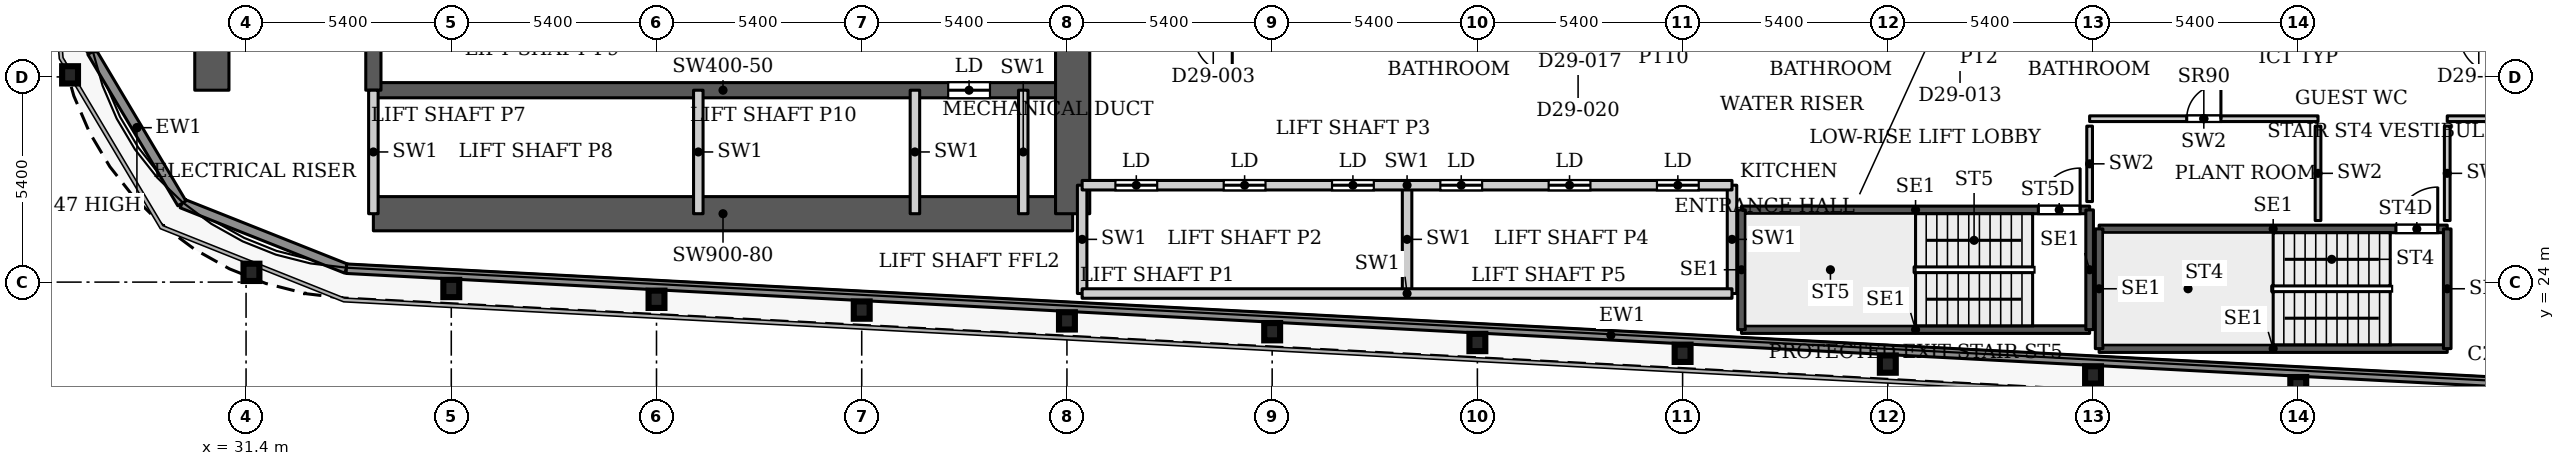
"""IFC4 building model, lengths in metres.
Left out: names, types, materials, properties, quantities, classifications, styles, units other than length and angle.
Written with IfcOpenShell. Run it as: python <this file> out.ifc"""

import sys

from ifc_helpers import new_model, si_unit, direction, frame, frame_2d, origin, origin_2d, place, context, subcontext, project, spatial, rectangle, i_section, extrude, source, transform, mapped, element, fill, save


model = new_model("IFC4")
c1 = context("Model", 3, precision=1e-05, world=origin(), true_north=direction((0.0, 1.0)))
c2 = subcontext(c1, "Body", "Model", "MODEL_VIEW")
j1 = project(units=[si_unit("LENGTHUNIT", "METRE"), si_unit("PLANEANGLEUNIT", "RADIAN")], contexts=[c1])
p1 = place(None, origin())
s1 = spatial("IfcSite", under=j1, at=p1, CompositionType="ELEMENT")
p2 = place(p1, origin())
s2 = spatial("IfcBuilding", under=s1, at=p2, CompositionType="ELEMENT")
p3 = place(p2, frame((0.0, 0.0, 125.3)))
s3 = spatial("IfcBuildingStorey", under=s2, at=p3, CompositionType="ELEMENT", Elevation=125.3)
for number, where, z_axis, x_axis in (
    (1, (85.4, 21.274, 0.0), (0.0, 0.0, 1.0), (1.0, 0.0, 0.0)),
    (2, (80.0, 21.558, 0.0), (0.0, 0.0, 1.0), (1.0, 0.0, 0.0)),
    (3, (74.6, 21.843, 0.0), (0.0, 0.0, 1.0), (1.0, 0.0, 0.0)),
    (4, (69.2, 22.127, 0.0), (0.0, 0.0, 1.0), (1.0, 0.0, 0.0)),
    (5, (63.8, 22.411, 0.0), (0.0, 0.0, 1.0), (1.0, 0.0, 0.0)),
    (6, (58.4, 22.695, 0.0), (0.0, 0.0, 1.0), (1.0, 0.0, 0.0)),
    (7, (53.0, 22.98, 0.0), (0.0, 0.0, 1.0), (1.0, 0.0, 0.0)),
    (8, (47.6, 23.264, 0.0), (0.0, 0.0, 1.0), (1.0, 0.0, 0.0)),
    (9, (42.2, 23.548, 0.0), (0.0, 0.0, 1.0), (1.0, 0.0, 0.0)),
    (10, (36.8, 23.832, 0.0), (0.0, 0.0, 1.0), (1.0, 0.0, 0.0)),
    (11, (31.542, 24.257, 0.0), (0.0, 0.0, 1.0), (1.0, 0.0, 0.0)),
    (12, (26.769, 29.454, 0.0), (0.0, 0.0, 1.0), (1.0, 0.0, 0.0)),
):
    element("IfcColumn", number, at=place(p3, frame(where, z_axis=z_axis, x_axis=x_axis)), inside=s3, PredefinedType="COLUMN", context=c2, shape_type="SweptSolid", body=[
        extrude(i_section(OverallWidth=0.418, OverallDepth=0.455, WebThickness=0.042, FlangeThickness=0.068, FilletRadius=0.014, at=origin_2d()), origin(), (0.0, 0.0, 1.0), 3.9),
    ])
p4 = place(p3, frame((34.75, 25.8, 0.0), z_axis=(0.0, 0.0, 1.0), x_axis=(1.0, 0.0, 0.0)))
e13 = element("IfcWall", 13, at=p4, inside=s3, PredefinedType="SHEAR", context=c2, shape_type="SweptSolid", body=[
    extrude(rectangle(XDim=18.4, YDim=0.9, at=frame_2d((9.2, 0.0))), origin(), (0.0, 0.0, 1.0), 3.9),
])
p5 = place(p3, frame((34.75, 29.05, 0.0), z_axis=(0.0, 0.0, 1.0), x_axis=(1.0, 0.0, 0.0)))
e14 = element("IfcWall", 14, at=p5, inside=s3, PredefinedType="SHEAR", context=c2, shape_type="SweptSolid", body=[
    extrude(rectangle(XDim=18.4, YDim=0.4, at=frame_2d((9.2, 0.0))), origin(), (0.0, 0.0, 1.0), 3.9),
])
p6 = place(p5, frame((15.125, 0.0, 0.0)))
e15 = element("IfcOpeningElement", 15, at=p6, cuts=e14, PredefinedType="OPENING", context=c2, shape_type="SweptSolid", body=[
    extrude(rectangle(XDim=1.1, YDim=2.2, at=frame_2d((0.55, 1.1))), frame((0.0, 0.21, 0.0), z_axis=(0.0, -1.0, 0.0), x_axis=(1.0, 0.0, 0.0)), (0.0, 0.0, 1.0), 0.42),
])
p7 = place(p3, frame((34.75, 29.05, 0.0), z_axis=(0.0, 0.0, 1.0), x_axis=(0.0, 1.0, 0.0)))
e16 = element("IfcWall", 16, at=p7, inside=s3, PredefinedType="SHEAR", context=c2, shape_type="SweptSolid", body=[
    extrude(rectangle(XDim=18.45, YDim=0.4, at=frame_2d((9.225, 0.0))), origin(), (0.0, 0.0, 1.0), 3.9),
])
p8 = place(p7, frame((8.025, 0.0, 0.0)))
e17 = element("IfcOpeningElement", 17, at=p8, cuts=e16, PredefinedType="OPENING", context=c2, shape_type="SweptSolid", body=[
    extrude(rectangle(XDim=1.1, YDim=2.2, at=frame_2d((0.55, 1.1))), frame((0.0, 0.21, 0.0), z_axis=(0.0, -1.0, 0.0), x_axis=(1.0, 0.0, 0.0)), (0.0, 0.0, 1.0), 0.42),
])
p9 = place(p7, frame((10.875, 0.0, 0.0)))
e18 = element("IfcOpeningElement", 18, at=p9, cuts=e16, PredefinedType="OPENING", context=c2, shape_type="SweptSolid", body=[
    extrude(rectangle(XDim=1.1, YDim=2.2, at=frame_2d((0.55, 1.1))), frame((0.0, 0.21, 0.0), z_axis=(0.0, -1.0, 0.0), x_axis=(1.0, 0.0, 0.0)), (0.0, 0.0, 1.0), 0.42),
])
p10 = place(p7, frame((13.725, 0.0, 0.0)))
e19 = element("IfcOpeningElement", 19, at=p10, cuts=e16, PredefinedType="OPENING", context=c2, shape_type="SweptSolid", body=[
    extrude(rectangle(XDim=1.1, YDim=2.2, at=frame_2d((0.55, 1.1))), frame((0.0, 0.21, 0.0), z_axis=(0.0, -1.0, 0.0), x_axis=(1.0, 0.0, 0.0)), (0.0, 0.0, 1.0), 0.42),
])
p11 = place(p7, frame((15.95, 0.0, 0.0)))
e20 = element("IfcOpeningElement", 20, at=p11, cuts=e16, PredefinedType="OPENING", context=c2, shape_type="SweptSolid", body=[
    extrude(rectangle(XDim=1.1, YDim=2.2, at=frame_2d((0.55, 1.1))), frame((0.0, 0.21, 0.0), z_axis=(0.0, -1.0, 0.0), x_axis=(1.0, 0.0, 0.0)), (0.0, 0.0, 1.0), 0.42),
])
p12 = place(p3, frame((30.5, 29.05, 0.0), z_axis=(0.0, 0.0, 1.0), x_axis=(0.0, 1.0, 0.0)))
e21 = element("IfcWall", 21, at=p12, inside=s3, PredefinedType="SHEAR", context=c2, shape_type="SweptSolid", body=[
    extrude(rectangle(XDim=18.45, YDim=0.9, at=frame_2d((9.225, 0.0))), origin(), (0.0, 0.0, 1.0), 3.9),
])
p13 = place(p12, frame((6.55, 0.0, 0.0)))
e22 = element("IfcOpeningElement", 22, at=p13, cuts=e21, PredefinedType="OPENING", context=c2, shape_type="SweptSolid", body=[
    extrude(rectangle(XDim=0.9, YDim=2.2, at=frame_2d((0.45, 1.1))), frame((0.0, 0.46, 0.0), z_axis=(0.0, -1.0, 0.0), x_axis=(1.0, 0.0, 0.0)), (0.0, 0.0, 1.0), 0.92),
])
p14 = place(p12, frame((11.025, 0.0, 0.0)))
e23 = element("IfcOpeningElement", 23, at=p14, cuts=e21, PredefinedType="OPENING", context=c2, shape_type="SweptSolid", body=[
    extrude(rectangle(XDim=0.9, YDim=2.2, at=frame_2d((0.45, 1.1))), frame((0.0, 0.46, 0.0), z_axis=(0.0, -1.0, 0.0), x_axis=(1.0, 0.0, 0.0)), (0.0, 0.0, 1.0), 0.92),
])
p15 = place(p3, frame((53.15, 25.8, 0.0), z_axis=(0.0, 0.0, 1.0), x_axis=(0.0, 1.0, 0.0)))
e24 = element("IfcWall", 24, at=p15, inside=s3, PredefinedType="SHEAR", context=c2, shape_type="SweptSolid", body=[
    extrude(rectangle(XDim=10.4, YDim=0.9, at=frame_2d((5.2, 0.0))), origin(), (0.0, 0.0, 1.0), 3.9),
])
p16 = place(p3, frame((34.039, 24.353, 0.0), z_axis=(0.0, 0.0, 1.0), x_axis=(-0.929352825399, 0.369192803184, 0.0)))
e25 = element("IfcWall", 25, at=p16, inside=s3, PredefinedType="SOLIDWALL", context=c2, shape_type="SweptSolid", body=[
    extrude(rectangle(XDim=4.656, YDim=0.25, at=frame_2d((2.328, 0.0))), origin(), (0.0, 0.0, 1.0), 3.75),
])
p17 = place(p3, frame((29.712, 26.072, 0.0), z_axis=(0.0, 0.0, 1.0), x_axis=(-0.511028049012, 0.859564036662, 0.0)))
e26 = element("IfcWall", 26, at=p17, inside=s3, PredefinedType="SOLIDWALL", context=c2, shape_type="SweptSolid", body=[
    extrude(rectangle(XDim=4.634, YDim=0.25, at=frame_2d((2.317, 0.0))), origin(), (0.0, 0.0, 1.0), 3.147),
])
p18 = place(p3, frame((27.344, 30.055, 0.0), z_axis=(0.0, 0.0, 1.0), x_axis=(-0.077571675317, 0.99698677784, 0.0)))
e27 = element("IfcWall", 27, at=p18, inside=s3, PredefinedType="SOLIDWALL", context=c2, shape_type="SweptSolid", body=[
    extrude(rectangle(XDim=1.92, YDim=0.25, at=frame_2d((0.96, 0.0))), origin(), (0.0, 0.0, 1.0), 3.75),
])
p19 = place(p3, frame((100.586, 20.85, 0.0), z_axis=(0.0, 0.0, 1.0), x_axis=(-0.99861746497, 0.052565755559, 0.0)))
e28 = element("IfcWall", 28, at=p19, inside=s3, PredefinedType="SOLIDWALL", context=c2, shape_type="SweptSolid", body=[
    extrude(rectangle(XDim=66.639, YDim=0.25, at=frame_2d((33.319, 0.0))), origin(), (0.0, 0.0, 1.0), 3.75),
])
p20 = place(p3, frame((80.16, 22.25, 0.0), z_axis=(0.0, 0.0, 1.0), x_axis=(1.0, 0.0, 0.0)))
e29 = element("IfcWall", 29, at=p20, inside=s3, PredefinedType="SHEAR", context=c2, shape_type="SweptSolid", body=[
    extrude(rectangle(XDim=9.16, YDim=0.2, at=frame_2d((4.58, 0.0))), origin(), (0.0, 0.0, 1.0), 3.9),
])
p21 = place(p3, frame((80.16, 25.4, 0.0), z_axis=(0.0, 0.0, 1.0), x_axis=(1.0, 0.0, 0.0)))
e30 = element("IfcWall", 30, at=p21, inside=s3, PredefinedType="SHEAR", context=c2, shape_type="SweptSolid", body=[
    extrude(rectangle(XDim=9.16, YDim=0.2, at=frame_2d((4.58, 0.0))), origin(), (0.0, 0.0, 1.0), 3.9),
])
p22 = place(p21, frame((7.81, 0.0, 0.0)))
e31 = element("IfcOpeningElement", 31, at=p22, cuts=e30, PredefinedType="OPENING", context=c2, shape_type="SweptSolid", body=[
    extrude(rectangle(XDim=1.1, YDim=2.2, at=frame_2d((0.55, 1.1))), frame((0.0, 0.11, 0.0), z_axis=(0.0, -1.0, 0.0), x_axis=(1.0, 0.0, 0.0)), (0.0, 0.0, 1.0), 0.22),
])
for number, where, z_axis, x_axis in (
    (32, (80.16, 22.25, 0.0), (0.0, 0.0, 1.0), (0.0, 1.0, 0.0)),
    (33, (89.32, 22.25, 0.0), (0.0, 0.0, 1.0), (0.0, 1.0, 0.0)),
):
    element("IfcWall", number, at=place(p3, frame(where, z_axis=z_axis, x_axis=x_axis)), inside=s3, PredefinedType="SHEAR", context=c2, shape_type="SweptSolid", body=[
        extrude(rectangle(XDim=3.15, YDim=0.2, at=frame_2d((1.575, 0.0))), origin(), (0.0, 0.0, 1.0), 3.9),
    ])
p23 = place(p3, frame((70.75, 22.75, 0.0), z_axis=(0.0, 0.0, 1.0), x_axis=(1.0, 0.0, 0.0)))
e34 = element("IfcWall", 34, at=p23, inside=s3, PredefinedType="SHEAR", context=c2, shape_type="SweptSolid", body=[
    extrude(rectangle(XDim=9.16, YDim=0.2, at=frame_2d((4.58, 0.0))), origin(), (0.0, 0.0, 1.0), 3.9),
])
p24 = place(p3, frame((70.75, 25.9, 0.0), z_axis=(0.0, 0.0, 1.0), x_axis=(1.0, 0.0, 0.0)))
e35 = element("IfcWall", 35, at=p24, inside=s3, PredefinedType="SHEAR", context=c2, shape_type="SweptSolid", body=[
    extrude(rectangle(XDim=9.16, YDim=0.2, at=frame_2d((4.58, 0.0))), origin(), (0.0, 0.0, 1.0), 3.9),
])
p25 = place(p24, frame((7.81, 0.0, 0.0)))
e36 = element("IfcOpeningElement", 36, at=p25, cuts=e35, PredefinedType="OPENING", context=c2, shape_type="SweptSolid", body=[
    extrude(rectangle(XDim=1.1, YDim=2.2, at=frame_2d((0.55, 1.1))), frame((0.0, 0.11, 0.0), z_axis=(0.0, -1.0, 0.0), x_axis=(1.0, 0.0, 0.0)), (0.0, 0.0, 1.0), 0.22),
])
for number, where, z_axis, x_axis in (
    (37, (70.75, 22.75, 0.0), (0.0, 0.0, 1.0), (0.0, 1.0, 0.0)),
    (38, (79.91, 22.75, 0.0), (0.0, 0.0, 1.0), (0.0, 1.0, 0.0)),
):
    element("IfcWall", number, at=place(p3, frame(where, z_axis=z_axis, x_axis=x_axis)), inside=s3, PredefinedType="SHEAR", context=c2, shape_type="SweptSolid", body=[
        extrude(rectangle(XDim=3.15, YDim=0.2, at=frame_2d((1.575, 0.0))), origin(), (0.0, 0.0, 1.0), 3.9),
    ])
for number, where, z_axis, x_axis in (
    (39, (34.75, 25.8, 0.0), (0.0, 0.0, 1.0), (0.0, 1.0, 0.0)),
    (40, (43.3, 25.8, 0.0), (0.0, 0.0, 1.0), (0.0, 1.0, 0.0)),
    (41, (49.0, 25.8, 0.0), (0.0, 0.0, 1.0), (0.0, 1.0, 0.0)),
    (42, (51.85, 25.8, 0.0), (0.0, 0.0, 1.0), (0.0, 1.0, 0.0)),
):
    element("IfcWall", number, at=place(p3, frame(where, z_axis=z_axis, x_axis=x_axis)), inside=s3, PredefinedType="PARTITIONING", context=c2, shape_type="SweptSolid", body=[
        extrude(rectangle(XDim=3.25, YDim=0.25, at=frame_2d((1.625, 0.0))), origin(), (0.0, 0.0, 1.0), 3.9),
    ])
for number, where, z_axis, x_axis in (
    (43, (53.4, 23.7, 0.0), (0.0, 0.0, 1.0), (0.0, 1.0, 0.0)),
    (44, (61.95, 23.7, 0.0), (0.0, 0.0, 1.0), (0.0, 1.0, 0.0)),
    (45, (70.5, 23.7, 0.0), (0.0, 0.0, 1.0), (0.0, 1.0, 0.0)),
):
    element("IfcWall", number, at=place(p3, frame(where, z_axis=z_axis, x_axis=x_axis)), inside=s3, PredefinedType="PARTITIONING", context=c2, shape_type="SweptSolid", body=[
        extrude(rectangle(XDim=2.85, YDim=0.25, at=frame_2d((1.425, 0.0))), origin(), (0.0, 0.0, 1.0), 3.9),
    ])
p26 = place(p3, frame((53.4, 23.7, 0.0), z_axis=(0.0, 0.0, 1.0), x_axis=(1.0, 0.0, 0.0)))
e46 = element("IfcWall", 46, at=p26, inside=s3, PredefinedType="PARTITIONING", context=c2, shape_type="SweptSolid", body=[
    extrude(rectangle(XDim=17.1, YDim=0.25, at=frame_2d((8.55, 0.0))), origin(), (0.0, 0.0, 1.0), 3.9),
])
p27 = place(p3, frame((53.4, 26.55, 0.0), z_axis=(0.0, 0.0, 1.0), x_axis=(1.0, 0.0, 0.0)))
e47 = element("IfcWall", 47, at=p27, inside=s3, PredefinedType="PARTITIONING", context=c2, shape_type="SweptSolid", body=[
    extrude(rectangle(XDim=17.1, YDim=0.25, at=frame_2d((8.55, 0.0))), origin(), (0.0, 0.0, 1.0), 3.9),
])
p28 = place(p27, frame((0.875, 0.0, 0.0)))
e48 = element("IfcOpeningElement", 48, at=p28, cuts=e47, PredefinedType="OPENING", context=c2, shape_type="SweptSolid", body=[
    extrude(rectangle(XDim=1.1, YDim=2.2, at=frame_2d((0.55, 1.1))), frame((0.0, 0.135, 0.0), z_axis=(0.0, -1.0, 0.0), x_axis=(1.0, 0.0, 0.0)), (0.0, 0.0, 1.0), 0.27),
])
p29 = place(p27, frame((3.725, 0.0, 0.0)))
e49 = element("IfcOpeningElement", 49, at=p29, cuts=e47, PredefinedType="OPENING", context=c2, shape_type="SweptSolid", body=[
    extrude(rectangle(XDim=1.1, YDim=2.2, at=frame_2d((0.55, 1.1))), frame((0.0, 0.135, 0.0), z_axis=(0.0, -1.0, 0.0), x_axis=(1.0, 0.0, 0.0)), (0.0, 0.0, 1.0), 0.27),
])
p30 = place(p27, frame((6.575, 0.0, 0.0)))
e50 = element("IfcOpeningElement", 50, at=p30, cuts=e47, PredefinedType="OPENING", context=c2, shape_type="SweptSolid", body=[
    extrude(rectangle(XDim=1.1, YDim=2.2, at=frame_2d((0.55, 1.1))), frame((0.0, 0.135, 0.0), z_axis=(0.0, -1.0, 0.0), x_axis=(1.0, 0.0, 0.0)), (0.0, 0.0, 1.0), 0.27),
])
p31 = place(p27, frame((9.425, 0.0, 0.0)))
e51 = element("IfcOpeningElement", 51, at=p31, cuts=e47, PredefinedType="OPENING", context=c2, shape_type="SweptSolid", body=[
    extrude(rectangle(XDim=1.1, YDim=2.2, at=frame_2d((0.55, 1.1))), frame((0.0, 0.135, 0.0), z_axis=(0.0, -1.0, 0.0), x_axis=(1.0, 0.0, 0.0)), (0.0, 0.0, 1.0), 0.27),
])
p32 = place(p27, frame((12.275, 0.0, 0.0)))
e52 = element("IfcOpeningElement", 52, at=p32, cuts=e47, PredefinedType="OPENING", context=c2, shape_type="SweptSolid", body=[
    extrude(rectangle(XDim=1.1, YDim=2.2, at=frame_2d((0.55, 1.1))), frame((0.0, 0.135, 0.0), z_axis=(0.0, -1.0, 0.0), x_axis=(1.0, 0.0, 0.0)), (0.0, 0.0, 1.0), 0.27),
])
p33 = place(p27, frame((15.125, 0.0, 0.0)))
e53 = element("IfcOpeningElement", 53, at=p33, cuts=e47, PredefinedType="OPENING", context=c2, shape_type="SweptSolid", body=[
    extrude(rectangle(XDim=1.1, YDim=2.2, at=frame_2d((0.55, 1.1))), frame((0.0, 0.135, 0.0), z_axis=(0.0, -1.0, 0.0), x_axis=(1.0, 0.0, 0.0)), (0.0, 0.0, 1.0), 0.27),
])
p34 = place(p3, frame((79.91, 28.3, 0.0), z_axis=(0.0, 0.0, 1.0), x_axis=(1.0, 0.0, 0.0)))
e54 = element("IfcWall", 54, at=p34, inside=s3, PredefinedType="PARTITIONING", context=c2, shape_type="SweptSolid", body=[
    extrude(rectangle(XDim=6.01, YDim=0.15, at=frame_2d((3.005, 0.0))), origin(), (0.0, 0.0, 1.0), 3.9),
])
p35 = place(p34, frame((2.555, 0.0, 0.0)))
e55 = element("IfcOpeningElement", 55, at=p35, cuts=e54, PredefinedType="OPENING", context=c2, shape_type="SweptSolid", body=[
    extrude(rectangle(XDim=0.9, YDim=2.2, at=frame_2d((0.45, 1.1))), frame((0.0, 0.085, 0.0), z_axis=(0.0, -1.0, 0.0), x_axis=(1.0, 0.0, 0.0)), (0.0, 0.0, 1.0), 0.17),
])
p36 = place(p3, frame((79.91, 26.12, 0.0), z_axis=(0.0, 0.0, 1.0), x_axis=(0.0, 1.0, 0.0)))
e56 = element("IfcWall", 56, at=p36, inside=s3, PredefinedType="PARTITIONING", context=c2, shape_type="SweptSolid", body=[
    extrude(rectangle(XDim=1.985, YDim=0.15, at=frame_2d((0.992, 0.0))), origin(), (0.0, 0.0, 1.0), 3.9),
])
p37 = place(p3, frame((85.92, 25.62, 0.0), z_axis=(0.0, 0.0, 1.0), x_axis=(0.0, 1.0, 0.0)))
e57 = element("IfcWall", 57, at=p37, inside=s3, PredefinedType="PARTITIONING", context=c2, shape_type="SweptSolid", body=[
    extrude(rectangle(XDim=2.485, YDim=0.15, at=frame_2d((1.242, 0.0))), origin(), (0.0, 0.0, 1.0), 3.9),
])
p38 = place(p3, frame((89.32, 28.3, 0.0), z_axis=(0.0, 0.0, 1.0), x_axis=(1.0, 0.0, 0.0)))
e58 = element("IfcWall", 58, at=p38, inside=s3, PredefinedType="PARTITIONING", context=c2, shape_type="SweptSolid", body=[
    extrude(rectangle(XDim=10.578, YDim=0.15, at=frame_2d((5.289, 0.0))), origin(), (0.0, 0.0, 1.0), 2.5),
])
p39 = place(p38, frame((3.89, 0.0, 0.0)))
e59 = element("IfcOpeningElement", 59, at=p39, cuts=e58, PredefinedType="OPENING", context=c2, shape_type="SweptSolid", body=[
    extrude(rectangle(XDim=0.9, YDim=2.2, at=frame_2d((0.45, 1.1))), frame((0.0, 0.085, 0.0), z_axis=(0.0, -1.0, 0.0), x_axis=(1.0, 0.0, 0.0)), (0.0, 0.0, 1.0), 0.17),
])
p40 = place(p3, frame((89.32, 25.62, 0.0), z_axis=(0.0, 0.0, 1.0), x_axis=(0.0, 1.0, 0.0)))
e60 = element("IfcWall", 60, at=p40, inside=s3, PredefinedType="PARTITIONING", context=c2, shape_type="SweptSolid", body=[
    extrude(rectangle(XDim=2.485, YDim=0.15, at=frame_2d((1.242, 0.0))), origin(), (0.0, 0.0, 1.0), 3.9),
])
m1 = source(origin(), c2, "Body", "SweptSolid", [
    extrude(rectangle(XDim=1.1, YDim=2.2, at=frame_2d((0.55, 1.1))), frame((0.0, 0.025, 0.0), z_axis=(0.0, -1.0, 0.0), x_axis=(1.0, 0.0, 0.0)), (0.0, 0.0, 1.0), 0.05),
])
p41 = place(p28, origin())
e61 = element("IfcDoor", 61, at=p41, inside=s3, OperationType="SLIDING_TO_LEFT", PredefinedType="DOOR", context=c2, shape_type="MappedRepresentation", body=[
    mapped(m1, transform((0.0, 0.0, 0.0), x_axis=(1.0, 0.0, 0.0), y_axis=(0.0, 1.0, 0.0), z_axis=(0.0, 0.0, 1.0), scale=1.0)),
])
fill(e48, e61)
p42 = place(p29, origin())
e62 = element("IfcDoor", 62, at=p42, inside=s3, OperationType="SLIDING_TO_LEFT", PredefinedType="DOOR", context=c2, shape_type="MappedRepresentation", body=[
    mapped(m1, transform((0.0, 0.0, 0.0), x_axis=(1.0, 0.0, 0.0), y_axis=(0.0, 1.0, 0.0), z_axis=(0.0, 0.0, 1.0), scale=1.0)),
])
fill(e49, e62)
p43 = place(p30, origin())
e63 = element("IfcDoor", 63, at=p43, inside=s3, OperationType="SLIDING_TO_LEFT", PredefinedType="DOOR", context=c2, shape_type="MappedRepresentation", body=[
    mapped(m1, transform((0.0, 0.0, 0.0), x_axis=(1.0, 0.0, 0.0), y_axis=(0.0, 1.0, 0.0), z_axis=(0.0, 0.0, 1.0), scale=1.0)),
])
fill(e50, e63)
p44 = place(p31, origin())
e64 = element("IfcDoor", 64, at=p44, inside=s3, OperationType="SLIDING_TO_LEFT", PredefinedType="DOOR", context=c2, shape_type="MappedRepresentation", body=[
    mapped(m1, transform((0.0, 0.0, 0.0), x_axis=(1.0, 0.0, 0.0), y_axis=(0.0, 1.0, 0.0), z_axis=(0.0, 0.0, 1.0), scale=1.0)),
])
fill(e51, e64)
p45 = place(p32, origin())
e65 = element("IfcDoor", 65, at=p45, inside=s3, OperationType="SLIDING_TO_LEFT", PredefinedType="DOOR", context=c2, shape_type="MappedRepresentation", body=[
    mapped(m1, transform((0.0, 0.0, 0.0), x_axis=(1.0, 0.0, 0.0), y_axis=(0.0, 1.0, 0.0), z_axis=(0.0, 0.0, 1.0), scale=1.0)),
])
fill(e52, e65)
p46 = place(p33, origin())
e66 = element("IfcDoor", 66, at=p46, inside=s3, OperationType="SLIDING_TO_LEFT", PredefinedType="DOOR", context=c2, shape_type="MappedRepresentation", body=[
    mapped(m1, transform((0.0, 0.0, 0.0), x_axis=(1.0, 0.0, 0.0), y_axis=(0.0, 1.0, 0.0), z_axis=(0.0, 0.0, 1.0), scale=1.0)),
])
fill(e53, e66)
p47 = place(p6, origin())
e67 = element("IfcDoor", 67, at=p47, inside=s3, OperationType="SLIDING_TO_LEFT", PredefinedType="DOOR", context=c2, shape_type="MappedRepresentation", body=[
    mapped(m1, transform((0.0, 0.0, 0.0), x_axis=(1.0, 0.0, 0.0), y_axis=(0.0, 1.0, 0.0), z_axis=(0.0, 0.0, 1.0), scale=1.0)),
])
fill(e15, e67)
m2 = source(origin(), c2, "Body", "SweptSolid", [
    extrude(rectangle(XDim=0.9, YDim=2.2, at=frame_2d((0.45, 1.1))), frame((0.0, 0.025, 0.0), z_axis=(0.0, -1.0, 0.0), x_axis=(1.0, 0.0, 0.0)), (0.0, 0.0, 1.0), 0.05),
])
p48 = place(p35, origin())
e68 = element("IfcDoor", 68, at=p48, inside=s3, OperationType="SINGLE_SWING_LEFT", PredefinedType="DOOR", context=c2, shape_type="MappedRepresentation", body=[
    mapped(m2, transform((0.0, 0.0, 0.0), x_axis=(1.0, 0.0, 0.0), y_axis=(0.0, 1.0, 0.0), z_axis=(0.0, 0.0, 1.0), scale=1.0)),
])
fill(e55, e68)
m3 = source(origin(), c2, "Body", "SweptSolid", [
    extrude(rectangle(XDim=1.1, YDim=2.2, at=frame_2d((0.55, 1.1))), frame((0.0, 0.025, 0.0), z_axis=(0.0, -1.0, 0.0), x_axis=(1.0, 0.0, 0.0)), (0.0, 0.0, 1.0), 0.05),
])
p49 = place(p22, origin())
e69 = element("IfcDoor", 69, at=p49, inside=s3, OperationType="SINGLE_SWING_LEFT", PredefinedType="DOOR", context=c2, shape_type="MappedRepresentation", body=[
    mapped(m3, transform((0.0, 0.0, 0.0), x_axis=(1.0, 0.0, 0.0), y_axis=(0.0, 1.0, 0.0), z_axis=(0.0, 0.0, 1.0), scale=1.0)),
])
fill(e31, e69)
p50 = place(p25, origin())
e70 = element("IfcDoor", 70, at=p50, inside=s3, OperationType="SINGLE_SWING_LEFT", PredefinedType="DOOR", context=c2, shape_type="MappedRepresentation", body=[
    mapped(m3, transform((0.0, 0.0, 0.0), x_axis=(1.0, 0.0, 0.0), y_axis=(0.0, 1.0, 0.0), z_axis=(0.0, 0.0, 1.0), scale=1.0)),
])
fill(e36, e70)
save(model, sys.argv[1])
